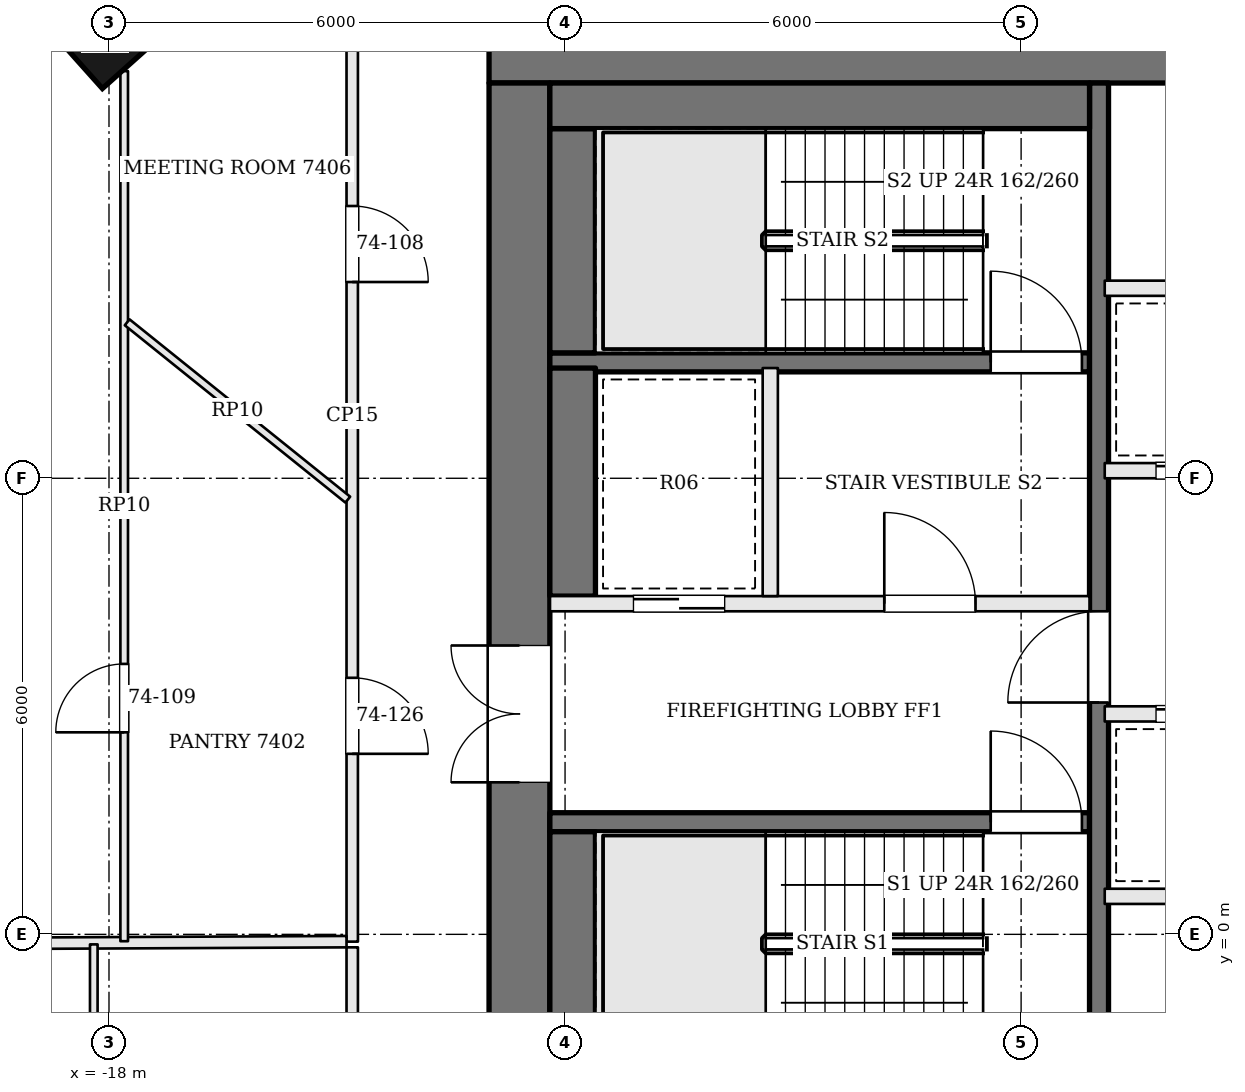
"""IFC4 building model, lengths in metres.
Left out: names, types, materials, properties, quantities, classifications, styles, units other than length and angle.
Written with IfcOpenShell. Run it as: python <this file> out.ifc"""

import sys

from ifc_helpers import new_model, si_unit, direction, frame, frame_2d, origin, origin_2d, place, context, subcontext, project, spatial, rectangle, extrude, element, fill, save


model = new_model("IFC4")
c1 = context("Model", 3, precision=1e-05, world=origin(), true_north=direction((0.0, 1.0)))
c2 = subcontext(c1, "Body", "Model", "MODEL_VIEW")
j1 = project(units=[si_unit("LENGTHUNIT", "METRE"), si_unit("PLANEANGLEUNIT", "RADIAN")], contexts=[c1])
p1 = place(None, origin())
s1 = spatial("IfcSite", under=j1, at=p1, CompositionType="ELEMENT")
p2 = place(p1, origin())
s2 = spatial("IfcBuilding", under=s1, at=p2, CompositionType="ELEMENT")
p3 = place(p2, frame((0.0, 0.0, 300.0)))
s3 = spatial("IfcBuildingStorey", under=s2, at=p3, CompositionType="ELEMENT", Elevation=300.0)
p4 = place(p3, frame((-13.0, 11.6, 0.0), z_axis=(0.0, 0.0, 1.0), x_axis=(1.0, 0.0, 0.0)))
e1 = element("IfcWall", 1, at=p4, inside=s3, PredefinedType="SHEAR", context=c2, shape_type="SweptSolid", body=[
    extrude(rectangle(XDim=26.0, YDim=0.8, at=frame_2d((13.0, 0.0))), origin(), (0.0, 0.0, 1.0), 3.9),
])
p5 = place(p4, frame((8.975, 0.0, 0.0)))
e2 = element("IfcOpeningElement", 2, at=p5, cuts=e1, PredefinedType="OPENING", context=c2, shape_type="SweptSolid", body=[
    extrude(rectangle(XDim=0.7, YDim=2.1, at=frame_2d((0.35, 1.05))), frame((0.0, 0.41, 0.0), z_axis=(0.0, -1.0, 0.0), x_axis=(1.0, 0.0, 0.0)), (0.0, 0.0, 1.0), 0.82),
])
p6 = place(p4, frame((11.025, 0.0, 0.0)))
e3 = element("IfcOpeningElement", 3, at=p6, cuts=e1, PredefinedType="OPENING", context=c2, shape_type="SweptSolid", body=[
    extrude(rectangle(XDim=0.7, YDim=2.1, at=frame_2d((0.35, 1.05))), frame((0.0, 0.41, 0.0), z_axis=(0.0, -1.0, 0.0), x_axis=(1.0, 0.0, 0.0)), (0.0, 0.0, 1.0), 0.82),
])
p7 = place(p4, frame((12.925, 0.0, 0.0)))
e4 = element("IfcOpeningElement", 4, at=p7, cuts=e1, PredefinedType="OPENING", context=c2, shape_type="SweptSolid", body=[
    extrude(rectangle(XDim=1.0, YDim=2.1, at=frame_2d((0.5, 1.05))), frame((0.0, 0.41, 0.0), z_axis=(0.0, -1.0, 0.0), x_axis=(1.0, 0.0, 0.0)), (0.0, 0.0, 1.0), 0.82),
])
p8 = place(p4, frame((15.775, 0.0, 0.0)))
e5 = element("IfcOpeningElement", 5, at=p8, cuts=e1, PredefinedType="OPENING", context=c2, shape_type="SweptSolid", body=[
    extrude(rectangle(XDim=1.0, YDim=2.1, at=frame_2d((0.5, 1.05))), frame((0.0, 0.41, 0.0), z_axis=(0.0, -1.0, 0.0), x_axis=(1.0, 0.0, 0.0)), (0.0, 0.0, 1.0), 0.82),
])
p9 = place(p3, frame((-12.6, -2.2, 0.0), z_axis=(0.0, 0.0, 1.0), x_axis=(0.0, 1.0, 0.0)))
e6 = element("IfcWall", 6, at=p9, inside=s3, PredefinedType="SHEAR", context=c2, shape_type="SweptSolid", body=[
    extrude(rectangle(XDim=13.4, YDim=0.8, at=frame_2d((6.7, 0.0))), origin(), (0.0, 0.0, 1.0), 3.9),
])
p10 = place(p9, frame((4.2, 0.0, 0.0)))
e7 = element("IfcOpeningElement", 7, at=p10, cuts=e6, PredefinedType="OPENING", context=c2, shape_type="SweptSolid", body=[
    extrude(rectangle(XDim=1.8, YDim=2.1, at=frame_2d((0.9, 1.05))), frame((0.0, 0.41, 0.0), z_axis=(0.0, -1.0, 0.0), x_axis=(1.0, 0.0, 0.0)), (0.0, 0.0, 1.0), 0.82),
])
p11 = place(p3, frame((-18.051, 11.763, 0.0), z_axis=(0.0, 0.0, 1.0), x_axis=(-0.7456420961, -0.66634665492, 0.0)))
e8 = element("IfcColumn", 8, at=p11, inside=s3, PredefinedType="COLUMN", context=c2, shape_type="SweptSolid", body=[
    extrude(rectangle(XDim=0.9, YDim=0.9, at=origin_2d()), origin(), (0.0, 0.0, 1.0), 3.9),
])
p12 = place(p3, frame((-12.2, 1.475, 0.0), z_axis=(0.0, 0.0, 1.0), x_axis=(1.0, 0.0, 0.0)))
e9 = element("IfcWall", 9, at=p12, inside=s3, PredefinedType="SOLIDWALL", context=c2, shape_type="SweptSolid", body=[
    extrude(rectangle(XDim=7.1, YDim=0.25, at=frame_2d((3.55, 0.0))), origin(), (0.0, 0.0, 1.0), 3.7),
])
p13 = place(p12, frame((5.8, 0.0, 0.0)))
e10 = element("IfcOpeningElement", 10, at=p13, cuts=e9, PredefinedType="OPENING", context=c2, shape_type="SweptSolid", body=[
    extrude(rectangle(XDim=1.2, YDim=2.1, at=frame_2d((0.6, 1.05))), frame((0.0, 0.135, 0.0), z_axis=(0.0, -1.0, 0.0), x_axis=(1.0, 0.0, 0.0)), (0.0, 0.0, 1.0), 0.27),
])
p14 = place(p3, frame((-12.2, 4.35, 0.0), z_axis=(0.0, 0.0, 1.0), x_axis=(1.0, 0.0, 0.0)))
e11 = element("IfcWall", 11, at=p14, inside=s3, PredefinedType="SOLIDWALL", context=c2, shape_type="SweptSolid", body=[
    extrude(rectangle(XDim=7.1, YDim=0.2, at=frame_2d((3.55, 0.0))), origin(), (0.0, 0.0, 1.0), 3.7),
])
p15 = place(p14, frame((4.4, 0.0, 0.0)))
e12 = element("IfcOpeningElement", 12, at=p15, cuts=e11, PredefinedType="OPENING", context=c2, shape_type="SweptSolid", body=[
    extrude(rectangle(XDim=1.2, YDim=2.1, at=frame_2d((0.6, 1.05))), frame((0.0, 0.11, 0.0), z_axis=(0.0, -1.0, 0.0), x_axis=(1.0, 0.0, 0.0)), (0.0, 0.0, 1.0), 0.22),
])
p16 = place(p14, frame((1.1, 0.0, 0.0)))
e13 = element("IfcOpeningElement", 13, at=p16, cuts=e11, PredefinedType="OPENING", context=c2, shape_type="SweptSolid", body=[
    extrude(rectangle(XDim=1.2, YDim=2.1, at=frame_2d((0.6, 1.05))), frame((0.0, 0.11, 0.0), z_axis=(0.0, -1.0, 0.0), x_axis=(1.0, 0.0, 0.0)), (0.0, 0.0, 1.0), 0.22),
])
p17 = place(p3, frame((-12.2, 7.525, 0.0), z_axis=(0.0, 0.0, 1.0), x_axis=(1.0, 0.0, 0.0)))
e14 = element("IfcWall", 14, at=p17, inside=s3, PredefinedType="SOLIDWALL", context=c2, shape_type="SweptSolid", body=[
    extrude(rectangle(XDim=7.1, YDim=0.25, at=frame_2d((3.55, 0.0))), origin(), (0.0, 0.0, 1.0), 3.7),
])
p18 = place(p17, frame((5.8, 0.0, 0.0)))
e15 = element("IfcOpeningElement", 15, at=p18, cuts=e14, PredefinedType="OPENING", context=c2, shape_type="SweptSolid", body=[
    extrude(rectangle(XDim=1.2, YDim=2.1, at=frame_2d((0.6, 1.05))), frame((0.0, 0.135, 0.0), z_axis=(0.0, -1.0, 0.0), x_axis=(1.0, 0.0, 0.0)), (0.0, 0.0, 1.0), 0.27),
])
p19 = place(p3, frame((-9.3, 4.45, 0.0), z_axis=(0.0, 0.0, 1.0), x_axis=(0.0, 1.0, 0.0)))
e16 = element("IfcWall", 16, at=p19, inside=s3, PredefinedType="SOLIDWALL", context=c2, shape_type="SweptSolid", body=[
    extrude(rectangle(XDim=3.0, YDim=0.2, at=frame_2d((1.5, 0.0))), origin(), (0.0, 0.0, 1.0), 3.7),
])
p20 = place(p3, frame((-4.975, -2.2, 0.0), z_axis=(0.0, 0.0, 1.0), x_axis=(0.0, 1.0, 0.0)))
e17 = element("IfcWall", 17, at=p20, inside=s3, PredefinedType="SOLIDWALL", context=c2, shape_type="SweptSolid", body=[
    extrude(rectangle(XDim=13.4, YDim=0.25, at=frame_2d((6.7, 0.0))), origin(), (0.0, 0.0, 1.0), 3.7),
])
p21 = place(p20, frame((5.25, 0.0, 0.0)))
e18 = element("IfcOpeningElement", 18, at=p21, cuts=e17, PredefinedType="OPENING", context=c2, shape_type="SweptSolid", body=[
    extrude(rectangle(XDim=1.2, YDim=2.1, at=frame_2d((0.6, 1.05))), frame((0.0, 0.135, 0.0), z_axis=(0.0, -1.0, 0.0), x_axis=(1.0, 0.0, 0.0)), (0.0, 0.0, 1.0), 0.27),
])
p22 = place(p3, frame((-11.9, -1.6, 0.0), z_axis=(0.0, 0.0, 1.0), x_axis=(0.0, 1.0, 0.0)))
e19 = element("IfcWall", 19, at=p22, inside=s3, PredefinedType="SOLIDWALL", context=c2, shape_type="SweptSolid", body=[
    extrude(rectangle(XDim=2.95, YDim=0.6, at=frame_2d((1.475, 0.0))), origin(), (0.0, 0.0, 1.0), 3.7),
])
p23 = place(p3, frame((-11.9, 4.45, 0.0), z_axis=(0.0, 0.0, 1.0), x_axis=(0.0, 1.0, 0.0)))
e20 = element("IfcWall", 20, at=p23, inside=s3, PredefinedType="SOLIDWALL", context=c2, shape_type="SweptSolid", body=[
    extrude(rectangle(XDim=3.0, YDim=0.6, at=frame_2d((1.5, 0.0))), origin(), (0.0, 0.0, 1.0), 3.7),
])
p24 = place(p3, frame((-11.9, 7.65, 0.0), z_axis=(0.0, 0.0, 1.0), x_axis=(0.0, 1.0, 0.0)))
e21 = element("IfcWall", 21, at=p24, inside=s3, PredefinedType="SOLIDWALL", context=c2, shape_type="SweptSolid", body=[
    extrude(rectangle(XDim=2.95, YDim=0.6, at=frame_2d((1.475, 0.0))), origin(), (0.0, 0.0, 1.0), 3.7),
])
p25 = place(p3, frame((-12.2, 10.9, 0.0), z_axis=(0.0, 0.0, 1.0), x_axis=(1.0, 0.0, 0.0)))
e22 = element("IfcWall", 22, at=p25, inside=s3, PredefinedType="SOLIDWALL", context=c2, shape_type="SweptSolid", body=[
    extrude(rectangle(XDim=7.1, YDim=0.6, at=frame_2d((3.55, 0.0))), origin(), (0.0, 0.0, 1.0), 3.7),
])
p26 = place(p3, frame((-4.9, 0.5, 0.0), z_axis=(0.0, 0.0, 1.0), x_axis=(1.0, 0.0, 0.0)))
e23 = element("IfcWall", 23, at=p26, inside=s3, PredefinedType="SOLIDWALL", context=c2, shape_type="SweptSolid", body=[
    extrude(rectangle(XDim=9.8, YDim=0.2, at=frame_2d((4.9, 0.0))), origin(), (0.0, 0.0, 1.0), 3.7),
])
p27 = place(p3, frame((-4.9, 2.9, 0.0), z_axis=(0.0, 0.0, 1.0), x_axis=(1.0, 0.0, 0.0)))
e24 = element("IfcWall", 24, at=p27, inside=s3, PredefinedType="SOLIDWALL", context=c2, shape_type="SweptSolid", body=[
    extrude(rectangle(XDim=9.8, YDim=0.2, at=frame_2d((4.9, 0.0))), origin(), (0.0, 0.0, 1.0), 3.7),
])
p28 = place(p27, frame((0.675, 0.0, 0.0)))
e25 = element("IfcOpeningElement", 25, at=p28, cuts=e24, PredefinedType="OPENING", context=c2, shape_type="SweptSolid", body=[
    extrude(rectangle(XDim=1.1, YDim=2.1, at=frame_2d((0.55, 1.05))), frame((0.0, 0.11, 0.0), z_axis=(0.0, -1.0, 0.0), x_axis=(1.0, 0.0, 0.0)), (0.0, 0.0, 1.0), 0.22),
])
p29 = place(p27, frame((2.613, 0.0, 0.0)))
e26 = element("IfcOpeningElement", 26, at=p29, cuts=e24, PredefinedType="OPENING", context=c2, shape_type="SweptSolid", body=[
    extrude(rectangle(XDim=0.9, YDim=2.1, at=frame_2d((0.45, 1.05))), frame((0.0, 0.11, 0.0), z_axis=(0.0, -1.0, 0.0), x_axis=(1.0, 0.0, 0.0)), (0.0, 0.0, 1.0), 0.22),
])
p30 = place(p27, frame((4.35, 0.0, 0.0)))
e27 = element("IfcOpeningElement", 27, at=p30, cuts=e24, PredefinedType="OPENING", context=c2, shape_type="SweptSolid", body=[
    extrude(rectangle(XDim=1.1, YDim=2.1, at=frame_2d((0.55, 1.05))), frame((0.0, 0.11, 0.0), z_axis=(0.0, -1.0, 0.0), x_axis=(1.0, 0.0, 0.0)), (0.0, 0.0, 1.0), 0.22),
])
p31 = place(p27, frame((7.463, 0.0, 0.0)))
e28 = element("IfcOpeningElement", 28, at=p31, cuts=e24, PredefinedType="OPENING", context=c2, shape_type="SweptSolid", body=[
    extrude(rectangle(XDim=1.0, YDim=2.1, at=frame_2d((0.5, 1.05))), frame((0.0, 0.11, 0.0), z_axis=(0.0, -1.0, 0.0), x_axis=(1.0, 0.0, 0.0)), (0.0, 0.0, 1.0), 0.22),
])
p32 = place(p3, frame((-4.9, 6.1, 0.0), z_axis=(0.0, 0.0, 1.0), x_axis=(1.0, 0.0, 0.0)))
e29 = element("IfcWall", 29, at=p32, inside=s3, PredefinedType="SOLIDWALL", context=c2, shape_type="SweptSolid", body=[
    extrude(rectangle(XDim=9.8, YDim=0.2, at=frame_2d((4.9, 0.0))), origin(), (0.0, 0.0, 1.0), 3.7),
])
p33 = place(p32, frame((0.675, 0.0, 0.0)))
e30 = element("IfcOpeningElement", 30, at=p33, cuts=e29, PredefinedType="OPENING", context=c2, shape_type="SweptSolid", body=[
    extrude(rectangle(XDim=1.1, YDim=2.1, at=frame_2d((0.55, 1.05))), frame((0.0, 0.11, 0.0), z_axis=(0.0, -1.0, 0.0), x_axis=(1.0, 0.0, 0.0)), (0.0, 0.0, 1.0), 0.22),
])
p34 = place(p32, frame((3.125, 0.0, 0.0)))
e31 = element("IfcOpeningElement", 31, at=p34, cuts=e29, PredefinedType="OPENING", context=c2, shape_type="SweptSolid", body=[
    extrude(rectangle(XDim=1.1, YDim=2.1, at=frame_2d((0.55, 1.05))), frame((0.0, 0.11, 0.0), z_axis=(0.0, -1.0, 0.0), x_axis=(1.0, 0.0, 0.0)), (0.0, 0.0, 1.0), 0.22),
])
p35 = place(p32, frame((5.575, 0.0, 0.0)))
e32 = element("IfcOpeningElement", 32, at=p35, cuts=e29, PredefinedType="OPENING", context=c2, shape_type="SweptSolid", body=[
    extrude(rectangle(XDim=1.1, YDim=2.1, at=frame_2d((0.55, 1.05))), frame((0.0, 0.11, 0.0), z_axis=(0.0, -1.0, 0.0), x_axis=(1.0, 0.0, 0.0)), (0.0, 0.0, 1.0), 0.22),
])
p36 = place(p32, frame((8.025, 0.0, 0.0)))
e33 = element("IfcOpeningElement", 33, at=p36, cuts=e29, PredefinedType="OPENING", context=c2, shape_type="SweptSolid", body=[
    extrude(rectangle(XDim=1.1, YDim=2.1, at=frame_2d((0.55, 1.05))), frame((0.0, 0.11, 0.0), z_axis=(0.0, -1.0, 0.0), x_axis=(1.0, 0.0, 0.0)), (0.0, 0.0, 1.0), 0.22),
])
p37 = place(p3, frame((-4.9, 8.5, 0.0), z_axis=(0.0, 0.0, 1.0), x_axis=(1.0, 0.0, 0.0)))
e34 = element("IfcWall", 34, at=p37, inside=s3, PredefinedType="SOLIDWALL", context=c2, shape_type="SweptSolid", body=[
    extrude(rectangle(XDim=9.8, YDim=0.2, at=frame_2d((4.9, 0.0))), origin(), (0.0, 0.0, 1.0), 3.7),
])
p38 = place(p3, frame((-14.8, 13.725, 0.0), z_axis=(0.0, 0.0, 1.0), x_axis=(0.0, -1.0, 0.0)))
e35 = element("IfcWall", 35, at=p38, inside=s3, PredefinedType="PARTITIONING", context=c2, shape_type="SweptSolid", body=[
    extrude(rectangle(XDim=13.821, YDim=0.15, at=frame_2d((6.911, 0.0))), origin(), (0.0, 0.0, 1.0), 3.198),
])
p39 = place(p38, frame((4.143, 0.0, 0.0)))
e36 = element("IfcOpeningElement", 36, at=p39, cuts=e35, PredefinedType="OPENING", context=c2, shape_type="SweptSolid", body=[
    extrude(rectangle(XDim=1.0, YDim=2.4, at=frame_2d((0.5, 1.2))), frame((0.0, 0.085, 0.0), z_axis=(0.0, -1.0, 0.0), x_axis=(1.0, 0.0, 0.0)), (0.0, 0.0, 1.0), 0.17),
])
p40 = place(p38, frame((10.35, 0.0, 0.0)))
e37 = element("IfcOpeningElement", 37, at=p40, cuts=e35, PredefinedType="OPENING", context=c2, shape_type="SweptSolid", body=[
    extrude(rectangle(XDim=1.0, YDim=2.1, at=frame_2d((0.5, 1.05))), frame((0.0, 0.085, 0.0), z_axis=(0.0, -1.0, 0.0), x_axis=(1.0, 0.0, 0.0)), (0.0, 0.0, 1.0), 0.17),
])
p41 = place(p3, frame((-26.674, -0.152, 0.0), z_axis=(0.0, 0.0, 1.0), x_axis=(0.999988676395, 0.004758895005, 0.0)))
e38 = element("IfcWall", 38, at=p41, inside=s3, PredefinedType="PARTITIONING", context=c2, shape_type="SweptSolid", body=[
    extrude(rectangle(XDim=11.8, YDim=0.15, at=frame_2d((5.9, 0.0))), origin(), (0.0, 0.0, 1.0), 3.234),
])
p42 = place(p3, frame((-14.8, -0.171, 0.0), z_axis=(0.0, 0.0, 1.0), x_axis=(0.0, -1.0, 0.0)))
e39 = element("IfcWall", 39, at=p42, inside=s3, PredefinedType="PARTITIONING", context=c2, shape_type="SweptSolid", body=[
    extrude(rectangle(XDim=4.629, YDim=0.15, at=frame_2d((2.314, 0.0))), origin(), (0.0, 0.0, 1.0), 3.198),
])
p43 = place(p42, frame((1.281, 0.0, 0.0)))
e40 = element("IfcOpeningElement", 40, at=p43, cuts=e39, PredefinedType="OPENING", context=c2, shape_type="SweptSolid", body=[
    extrude(rectangle(XDim=1.0, YDim=2.1, at=frame_2d((0.5, 1.05))), frame((0.0, 0.085, 0.0), z_axis=(0.0, -1.0, 0.0), x_axis=(1.0, 0.0, 0.0)), (0.0, 0.0, 1.0), 0.17),
])
p44 = place(p3, frame((-17.8, -0.09, 0.0), z_axis=(0.0, 0.0, 1.0), x_axis=(0.0, 1.0, 0.0)))
e41 = element("IfcWall", 41, at=p44, inside=s3, PredefinedType="PARTITIONING", context=c2, shape_type="SweptSolid", body=[
    extrude(rectangle(XDim=11.447, YDim=0.1, at=frame_2d((5.724, 0.0))), origin(), (0.0, 0.0, 1.0), 3.184),
])
p45 = place(p44, frame((2.748, 0.0, 0.0)))
e42 = element("IfcOpeningElement", 42, at=p45, cuts=e41, PredefinedType="OPENING", context=c2, shape_type="SweptSolid", body=[
    extrude(rectangle(XDim=0.9, YDim=2.1, at=frame_2d((0.45, 1.05))), frame((0.0, 0.06, 0.0), z_axis=(0.0, -1.0, 0.0), x_axis=(1.0, 0.0, 0.0)), (0.0, 0.0, 1.0), 0.12),
])
p46 = place(p3, frame((-14.858, 5.719, 0.0), z_axis=(0.0, 0.0, 1.0), x_axis=(-0.779434046092, 0.626484291737, 0.0)))
e43 = element("IfcWall", 43, at=p46, inside=s3, PredefinedType="PARTITIONING", context=c2, shape_type="SweptSolid", body=[
    extrude(rectangle(XDim=3.724, YDim=0.1, at=frame_2d((1.862, 0.0))), origin(), (0.0, 0.0, 1.0), 3.184),
])
p47 = place(p3, frame((-18.2, -8.2, 0.0), z_axis=(0.0, 0.0, 1.0), x_axis=(0.0, 1.0, 0.0)))
e44 = element("IfcWall", 44, at=p47, inside=s3, PredefinedType="PARTITIONING", context=c2, shape_type="SweptSolid", body=[
    extrude(rectangle(XDim=8.068, YDim=0.1, at=frame_2d((4.034, 0.0))), origin(), (0.0, 0.0, 1.0), 3.184),
])
p48 = place(p47, frame((5.378, 0.0, 0.0)))
e45 = element("IfcOpeningElement", 45, at=p48, cuts=e44, PredefinedType="OPENING", context=c2, shape_type="SweptSolid", body=[
    extrude(rectangle(XDim=1.0, YDim=2.1, at=frame_2d((0.5, 1.05))), frame((0.0, 0.06, 0.0), z_axis=(0.0, -1.0, 0.0), x_axis=(1.0, 0.0, 0.0)), (0.0, 0.0, 1.0), 0.12),
])
p49 = place(p10, origin())
e46 = element("IfcDoor", 46, at=p49, inside=s3, OperationType="DOUBLE_DOOR_SINGLE_SWING", PredefinedType="DOOR", context=c2, shape_type="SweptSolid", body=[
    extrude(rectangle(XDim=1.8, YDim=2.1, at=frame_2d((0.9, 1.05))), frame((0.0, 0.025, 0.0), z_axis=(0.0, -1.0, 0.0), x_axis=(1.0, 0.0, 0.0)), (0.0, 0.0, 1.0), 0.05),
])
fill(e7, e46)
p50 = place(p21, origin())
e47 = element("IfcDoor", 47, at=p50, inside=s3, OperationType="SINGLE_SWING_LEFT", PredefinedType="DOOR", context=c2, shape_type="SweptSolid", body=[
    extrude(rectangle(XDim=1.2, YDim=2.1, at=frame_2d((0.6, 1.05))), frame((0.0, 0.025, 0.0), z_axis=(0.0, -1.0, 0.0), x_axis=(1.0, 0.0, 0.0)), (0.0, 0.0, 1.0), 0.05),
])
fill(e18, e47)
p51 = place(p15, origin())
e48 = element("IfcDoor", 48, at=p51, inside=s3, OperationType="SINGLE_SWING_LEFT", PredefinedType="DOOR", context=c2, shape_type="SweptSolid", body=[
    extrude(rectangle(XDim=1.2, YDim=2.1, at=frame_2d((0.6, 1.05))), frame((0.0, 0.025, 0.0), z_axis=(0.0, -1.0, 0.0), x_axis=(1.0, 0.0, 0.0)), (0.0, 0.0, 1.0), 0.05),
])
fill(e12, e48)
p52 = place(p13, origin())
e49 = element("IfcDoor", 49, at=p52, inside=s3, OperationType="SINGLE_SWING_LEFT", PredefinedType="DOOR", context=c2, shape_type="SweptSolid", body=[
    extrude(rectangle(XDim=1.2, YDim=2.1, at=frame_2d((0.6, 1.05))), frame((0.0, 0.025, 0.0), z_axis=(0.0, -1.0, 0.0), x_axis=(1.0, 0.0, 0.0)), (0.0, 0.0, 1.0), 0.05),
])
fill(e10, e49)
p53 = place(p18, origin())
e50 = element("IfcDoor", 50, at=p53, inside=s3, OperationType="SINGLE_SWING_LEFT", PredefinedType="DOOR", context=c2, shape_type="SweptSolid", body=[
    extrude(rectangle(XDim=1.2, YDim=2.1, at=frame_2d((0.6, 1.05))), frame((0.0, 0.025, 0.0), z_axis=(0.0, -1.0, 0.0), x_axis=(1.0, 0.0, 0.0)), (0.0, 0.0, 1.0), 0.05),
])
fill(e15, e50)
p54 = place(p16, origin())
e51 = element("IfcDoor", 51, at=p54, inside=s3, OperationType="SLIDING_TO_RIGHT", PredefinedType="DOOR", context=c2, shape_type="SweptSolid", body=[
    extrude(rectangle(XDim=1.2, YDim=2.1, at=frame_2d((0.6, 1.05))), frame((0.0, 0.025, 0.0), z_axis=(0.0, -1.0, 0.0), x_axis=(1.0, 0.0, 0.0)), (0.0, 0.0, 1.0), 0.05),
])
fill(e13, e51)
p55 = place(p28, origin())
e52 = element("IfcDoor", 52, at=p55, inside=s3, OperationType="SLIDING_TO_RIGHT", PredefinedType="DOOR", context=c2, shape_type="SweptSolid", body=[
    extrude(rectangle(XDim=1.1, YDim=2.1, at=frame_2d((0.55, 1.05))), frame((0.0, 0.025, 0.0), z_axis=(0.0, -1.0, 0.0), x_axis=(1.0, 0.0, 0.0)), (0.0, 0.0, 1.0), 0.05),
])
fill(e25, e52)
p56 = place(p33, origin())
e53 = element("IfcDoor", 53, at=p56, inside=s3, OperationType="SLIDING_TO_RIGHT", PredefinedType="DOOR", context=c2, shape_type="SweptSolid", body=[
    extrude(rectangle(XDim=1.1, YDim=2.1, at=frame_2d((0.55, 1.05))), frame((0.0, 0.025, 0.0), z_axis=(0.0, -1.0, 0.0), x_axis=(1.0, 0.0, 0.0)), (0.0, 0.0, 1.0), 0.05),
])
fill(e30, e53)
p57 = place(p39, origin())
e54 = element("IfcDoor", 54, at=p57, inside=s3, OperationType="SINGLE_SWING_RIGHT", PredefinedType="DOOR", context=c2, shape_type="SweptSolid", body=[
    extrude(rectangle(XDim=1.0, YDim=2.4, at=frame_2d((0.5, 1.2))), frame((0.0, 0.025, 0.0), z_axis=(0.0, -1.0, 0.0), x_axis=(1.0, 0.0, 0.0)), (0.0, 0.0, 1.0), 0.05),
])
fill(e36, e54)
p58 = place(p45, origin())
e55 = element("IfcDoor", 55, at=p58, inside=s3, OperationType="SINGLE_SWING_LEFT", PredefinedType="DOOR", context=c2, shape_type="SweptSolid", body=[
    extrude(rectangle(XDim=0.9, YDim=2.1, at=frame_2d((0.45, 1.05))), frame((0.0, 0.025, 0.0), z_axis=(0.0, -1.0, 0.0), x_axis=(1.0, 0.0, 0.0)), (0.0, 0.0, 1.0), 0.05),
])
fill(e42, e55)
p59 = place(p40, origin())
e56 = element("IfcDoor", 56, at=p59, inside=s3, OperationType="SINGLE_SWING_RIGHT", PredefinedType="DOOR", context=c2, shape_type="SweptSolid", body=[
    extrude(rectangle(XDim=1.0, YDim=2.1, at=frame_2d((0.5, 1.05))), frame((0.0, 0.025, 0.0), z_axis=(0.0, -1.0, 0.0), x_axis=(1.0, 0.0, 0.0)), (0.0, 0.0, 1.0), 0.05),
])
fill(e37, e56)
save(model, sys.argv[1])
